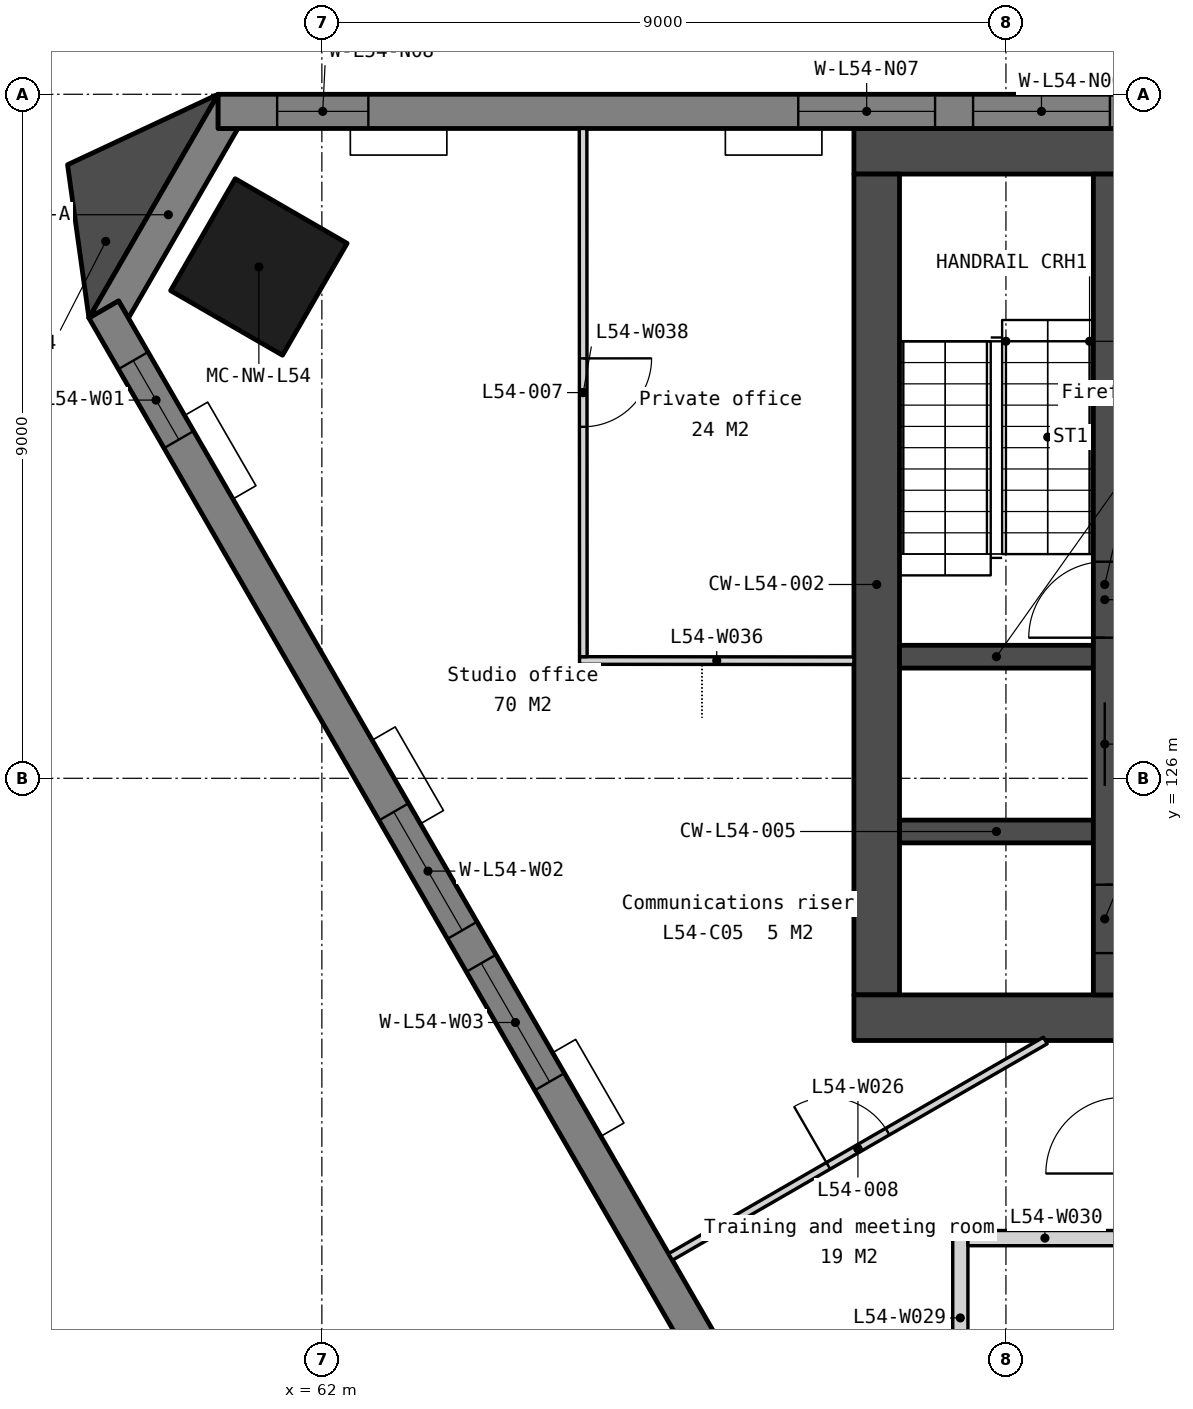
"""IFC4 building model, lengths in metres.
Left out: names, types, materials, properties, quantities, classifications, styles, units other than length and angle.
Written with IfcOpenShell. Run it as: python <this file> out.ifc"""

import sys

from ifc_helpers import new_model, si_unit, direction, frame, frame_2d, origin, origin_2d, place, context, subcontext, project, spatial, polyline, rectangle, outline, extrude, element, fill, save


model = new_model("IFC4")
c1 = context("Model", 3, precision=1e-05, world=origin(), true_north=direction((0.0, 1.0)))
c2 = subcontext(c1, "Body", "Model", "MODEL_VIEW")
j1 = project(units=[si_unit("LENGTHUNIT", "METRE"), si_unit("PLANEANGLEUNIT", "RADIAN")], contexts=[c1])
p1 = place(None, origin())
s1 = spatial("IfcSite", under=j1, at=p1, CompositionType="ELEMENT")
p2 = place(p1, origin())
s2 = spatial("IfcBuilding", under=s1, at=p2, CompositionType="ELEMENT")
p3 = place(p2, frame((0.0, 0.0, 215.3)))
s3 = spatial("IfcBuildingStorey", under=s2, at=p3, CompositionType="ELEMENT", Elevation=215.3)
p4 = place(p3, frame((61.171, 132.728, 0.0), z_axis=(0.0, 0.0, 1.0), x_axis=(-0.5, -0.866025403784, 0.0)))
e1 = element("IfcColumn", 1, at=p4, inside=s3, PredefinedType="COLUMN", context=c2, shape_type="SweptSolid", body=[
    extrude(rectangle(XDim=1.7, YDim=1.7, at=origin_2d()), origin(), (0.0, 0.0, 1.0), 3.9),
])
p5 = place(p3, frame((69.0, 134.25, 0.0), z_axis=(0.0, 0.0, 1.0), x_axis=(1.0, 0.0, 0.0)))
e2 = element("IfcWall", 2, at=p5, inside=s3, PredefinedType="SOLIDWALL", context=c2, shape_type="SweptSolid", body=[
    extrude(rectangle(XDim=22.0, YDim=0.6, at=frame_2d((11.0, 0.0))), origin(), (0.0, 0.0, 1.0), 3.75),
])
p6 = place(p3, frame((69.3, 133.95, 0.0), z_axis=(0.0, 0.0, 1.0), x_axis=(0.0, -1.0, 0.0)))
e3 = element("IfcWall", 3, at=p6, inside=s3, PredefinedType="SOLIDWALL", context=c2, shape_type="SweptSolid", body=[
    extrude(rectangle(XDim=10.8, YDim=0.6, at=frame_2d((5.4, 0.0))), origin(), (0.0, 0.0, 1.0), 3.75),
])
p7 = place(p3, frame((69.0, 122.85, 0.0), z_axis=(0.0, 0.0, 1.0), x_axis=(1.0, 0.0, 0.0)))
e4 = element("IfcWall", 4, at=p7, inside=s3, PredefinedType="SOLIDWALL", context=c2, shape_type="SweptSolid", body=[
    extrude(rectangle(XDim=22.0, YDim=0.6, at=frame_2d((11.0, 0.0))), origin(), (0.0, 0.0, 1.0), 3.75),
])
p8 = place(p7, frame((16.375, 0.0, 0.0)))
e5 = element("IfcOpeningElement", 5, at=p8, cuts=e4, PredefinedType="OPENING", context=c2, shape_type="SweptSolid", body=[
    extrude(rectangle(XDim=1.8, YDim=2.1, at=frame_2d((0.9, 1.05))), frame((0.0, 0.31, 0.0), z_axis=(0.0, -1.0, 0.0), x_axis=(1.0, 0.0, 0.0)), (0.0, 0.0, 1.0), 0.62),
])
p9 = place(p7, frame((3.825, 0.0, 0.0)))
e6 = element("IfcOpeningElement", 6, at=p9, cuts=e4, PredefinedType="OPENING", context=c2, shape_type="SweptSolid", body=[
    extrude(rectangle(XDim=1.8, YDim=2.1, at=frame_2d((0.9, 1.05))), frame((0.0, 0.31, 0.0), z_axis=(0.0, -1.0, 0.0), x_axis=(1.0, 0.0, 0.0)), (0.0, 0.0, 1.0), 0.62),
])
p10 = place(p7, frame((12.85, 0.0, 0.0)))
e7 = element("IfcOpeningElement", 7, at=p10, cuts=e4, PredefinedType="OPENING", context=c2, shape_type="SweptSolid", body=[
    extrude(rectangle(XDim=1.5, YDim=2.1, at=frame_2d((0.75, 1.05))), frame((0.0, 0.31, 0.0), z_axis=(0.0, -1.0, 0.0), x_axis=(1.0, 0.0, 0.0)), (0.0, 0.0, 1.0), 0.62),
])
for number, where, z_axis, x_axis in (
    (8, (69.6, 127.6, 0.0), (0.0, 0.0, 1.0), (1.0, 0.0, 0.0)),
    (9, (69.6, 125.3, 0.0), (0.0, 0.0, 1.0), (1.0, 0.0, 0.0)),
):
    element("IfcWall", number, at=place(p3, frame(where, z_axis=z_axis, x_axis=x_axis)), inside=s3, PredefinedType="SOLIDWALL", context=c2, shape_type="SweptSolid", body=[
        extrude(rectangle(XDim=2.55, YDim=0.3, at=frame_2d((1.275, 0.0))), origin(), (0.0, 0.0, 1.0), 3.75),
    ])
p11 = place(p3, frame((72.3, 133.95, 0.0), z_axis=(0.0, 0.0, 1.0), x_axis=(0.0, -1.0, 0.0)))
e10 = element("IfcWall", 10, at=p11, inside=s3, PredefinedType="SOLIDWALL", context=c2, shape_type="SweptSolid", body=[
    extrude(rectangle(XDim=10.8, YDim=0.3, at=frame_2d((5.4, 0.0))), origin(), (0.0, 0.0, 1.0), 3.75),
])
p12 = place(p11, frame((6.95, 0.0, 0.0)))
e11 = element("IfcOpeningElement", 11, at=p12, cuts=e10, PredefinedType="OPENING", context=c2, shape_type="SweptSolid", body=[
    extrude(rectangle(XDim=1.1, YDim=2.1, at=frame_2d((0.55, 1.05))), frame((0.0, 0.16, 0.0), z_axis=(0.0, -1.0, 0.0), x_axis=(1.0, 0.0, 0.0)), (0.0, 0.0, 1.0), 0.32),
])
p13 = place(p11, frame((9.35, 0.0, 0.0)))
e12 = element("IfcOpeningElement", 12, at=p13, cuts=e10, PredefinedType="OPENING", context=c2, shape_type="SweptSolid", body=[
    extrude(rectangle(XDim=0.9, YDim=2.1, at=frame_2d((0.45, 1.05))), frame((0.0, 0.16, 0.0), z_axis=(0.0, -1.0, 0.0), x_axis=(1.0, 0.0, 0.0)), (0.0, 0.0, 1.0), 0.32),
])
p14 = place(p11, frame((5.1, 0.0, 0.0)))
e13 = element("IfcOpeningElement", 13, at=p14, cuts=e10, PredefinedType="OPENING", context=c2, shape_type="SweptSolid", body=[
    extrude(rectangle(XDim=1.0, YDim=2.1, at=frame_2d((0.5, 1.05))), frame((0.0, 0.16, 0.0), z_axis=(0.0, -1.0, 0.0), x_axis=(1.0, 0.0, 0.0)), (0.0, 0.0, 1.0), 0.32),
])
p15 = place(p3, frame((0.0, 0.0, -0.15)))
e14 = element("IfcWall", 14, at=p15, inside=s3, PredefinedType="SOLIDWALL", context=c2, shape_type="SweptSolid", body=[
    extrude(outline(polyline([(60.635, 135.0), (60.635, 134.55), (60.895, 134.55), (59.455, 132.055), (59.325, 132.281), (58.935, 132.055), (60.635, 135.0)])), origin(), (0.0, 0.0, 1.0), 3.9),
])
p16 = place(p3, frame((99.365, 134.775, -0.15), z_axis=(0.0, 0.0, 1.0), x_axis=(-1.0, 0.0, 0.0)))
e15 = element("IfcWall", 15, at=p16, inside=s3, PredefinedType="SOLIDWALL", context=c2, shape_type="SweptSolid", body=[
    extrude(outline(polyline([(38.729, 0.0), (38.729, 3.9), (0.0, 3.9), (0.0, 0.0), (38.729, 0.0)])), frame((0.0, 0.225, 0.0), z_axis=(0.0, -1.0, 0.0), x_axis=(1.0, 0.0, 0.0)), (0.0, 0.0, 1.0), 0.45),
])
p17 = place(p16, frame((0.776, 0.0, 0.95)))
e16 = element("IfcOpeningElement", 16, at=p17, cuts=e15, PredefinedType="OPENING", context=c2, shape_type="SweptSolid", body=[
    extrude(rectangle(XDim=1.2, YDim=2.2, at=frame_2d((0.6, 1.1))), frame((0.0, 0.235, 0.0), z_axis=(0.0, -1.0, 0.0), x_axis=(1.0, 0.0, 0.0)), (0.0, 0.0, 1.0), 0.47),
])
p18 = place(p16, frame((7.632, 0.0, 0.95)))
e17 = element("IfcOpeningElement", 17, at=p18, cuts=e15, PredefinedType="OPENING", context=c2, shape_type="SweptSolid", body=[
    extrude(rectangle(XDim=1.8, YDim=2.2, at=frame_2d((0.9, 1.1))), frame((0.0, 0.235, 0.0), z_axis=(0.0, -1.0, 0.0), x_axis=(1.0, 0.0, 0.0)), (0.0, 0.0, 1.0), 0.47),
])
p19 = place(p16, frame((9.932, 0.0, 0.95)))
e18 = element("IfcOpeningElement", 18, at=p19, cuts=e15, PredefinedType="OPENING", context=c2, shape_type="SweptSolid", body=[
    extrude(rectangle(XDim=1.8, YDim=2.2, at=frame_2d((0.9, 1.1))), frame((0.0, 0.235, 0.0), z_axis=(0.0, -1.0, 0.0), x_axis=(1.0, 0.0, 0.0)), (0.0, 0.0, 1.0), 0.47),
])
p20 = place(p16, frame((17.315, 0.0, 0.95)))
e19 = element("IfcOpeningElement", 19, at=p20, cuts=e15, PredefinedType="OPENING", context=c2, shape_type="SweptSolid", body=[
    extrude(rectangle(XDim=1.8, YDim=2.2, at=frame_2d((0.9, 1.1))), frame((0.0, 0.235, 0.0), z_axis=(0.0, -1.0, 0.0), x_axis=(1.0, 0.0, 0.0)), (0.0, 0.0, 1.0), 0.47),
])
p21 = place(p16, frame((19.615, 0.0, 0.95)))
e20 = element("IfcOpeningElement", 20, at=p21, cuts=e15, PredefinedType="OPENING", context=c2, shape_type="SweptSolid", body=[
    extrude(rectangle(XDim=1.8, YDim=2.2, at=frame_2d((0.9, 1.1))), frame((0.0, 0.235, 0.0), z_axis=(0.0, -1.0, 0.0), x_axis=(1.0, 0.0, 0.0)), (0.0, 0.0, 1.0), 0.47),
])
p22 = place(p16, frame((26.997, 0.0, 0.95)))
e21 = element("IfcOpeningElement", 21, at=p22, cuts=e15, PredefinedType="OPENING", context=c2, shape_type="SweptSolid", body=[
    extrude(rectangle(XDim=1.8, YDim=2.2, at=frame_2d((0.9, 1.1))), frame((0.0, 0.235, 0.0), z_axis=(0.0, -1.0, 0.0), x_axis=(1.0, 0.0, 0.0)), (0.0, 0.0, 1.0), 0.47),
])
p23 = place(p16, frame((29.297, 0.0, 0.95)))
e22 = element("IfcOpeningElement", 22, at=p23, cuts=e15, PredefinedType="OPENING", context=c2, shape_type="SweptSolid", body=[
    extrude(rectangle(XDim=1.8, YDim=2.2, at=frame_2d((0.9, 1.1))), frame((0.0, 0.235, 0.0), z_axis=(0.0, -1.0, 0.0), x_axis=(1.0, 0.0, 0.0)), (0.0, 0.0, 1.0), 0.47),
])
p24 = place(p16, frame((36.753, 0.0, 0.95)))
e23 = element("IfcOpeningElement", 23, at=p24, cuts=e15, PredefinedType="OPENING", context=c2, shape_type="SweptSolid", body=[
    extrude(rectangle(XDim=1.2, YDim=2.2, at=frame_2d((0.6, 1.1))), frame((0.0, 0.235, 0.0), z_axis=(0.0, -1.0, 0.0), x_axis=(1.0, 0.0, 0.0)), (0.0, 0.0, 1.0), 0.47),
])
p25 = place(p3, frame((59.13, 132.168, -0.15), z_axis=(0.0, 0.0, 1.0), x_axis=(0.500002199942, -0.866024133644, 0.0)))
e24 = element("IfcWall", 24, at=p25, inside=s3, PredefinedType="SOLIDWALL", context=c2, shape_type="SweptSolid", body=[
    extrude(outline(polyline([(38.729, 0.0), (38.729, 3.9), (0.0, 3.9), (0.0, 0.0), (38.729, 0.0)])), frame((0.0, 0.225, 0.0), z_axis=(0.0, -1.0, 0.0), x_axis=(1.0, 0.0, 0.0)), (0.0, 0.0, 1.0), 0.45),
])
p26 = place(p25, frame((0.776, 0.0, 0.95)))
e25 = element("IfcOpeningElement", 25, at=p26, cuts=e24, PredefinedType="OPENING", context=c2, shape_type="SweptSolid", body=[
    extrude(rectangle(XDim=1.2, YDim=2.2, at=frame_2d((0.6, 1.1))), frame((0.0, 0.235, 0.0), z_axis=(0.0, -1.0, 0.0), x_axis=(1.0, 0.0, 0.0)), (0.0, 0.0, 1.0), 0.47),
])
p27 = place(p25, frame((7.632, 0.0, 0.95)))
e26 = element("IfcOpeningElement", 26, at=p27, cuts=e24, PredefinedType="OPENING", context=c2, shape_type="SweptSolid", body=[
    extrude(rectangle(XDim=1.8, YDim=2.2, at=frame_2d((0.9, 1.1))), frame((0.0, 0.235, 0.0), z_axis=(0.0, -1.0, 0.0), x_axis=(1.0, 0.0, 0.0)), (0.0, 0.0, 1.0), 0.47),
])
p28 = place(p25, frame((9.932, 0.0, 0.95)))
e27 = element("IfcOpeningElement", 27, at=p28, cuts=e24, PredefinedType="OPENING", context=c2, shape_type="SweptSolid", body=[
    extrude(rectangle(XDim=1.8, YDim=2.2, at=frame_2d((0.9, 1.1))), frame((0.0, 0.235, 0.0), z_axis=(0.0, -1.0, 0.0), x_axis=(1.0, 0.0, 0.0)), (0.0, 0.0, 1.0), 0.47),
])
p29 = place(p25, frame((17.315, 0.0, 0.95)))
e28 = element("IfcOpeningElement", 28, at=p29, cuts=e24, PredefinedType="OPENING", context=c2, shape_type="SweptSolid", body=[
    extrude(rectangle(XDim=1.8, YDim=2.2, at=frame_2d((0.9, 1.1))), frame((0.0, 0.235, 0.0), z_axis=(0.0, -1.0, 0.0), x_axis=(1.0, 0.0, 0.0)), (0.0, 0.0, 1.0), 0.47),
])
p30 = place(p25, frame((19.615, 0.0, 0.95)))
e29 = element("IfcOpeningElement", 29, at=p30, cuts=e24, PredefinedType="OPENING", context=c2, shape_type="SweptSolid", body=[
    extrude(rectangle(XDim=1.8, YDim=2.2, at=frame_2d((0.9, 1.1))), frame((0.0, 0.235, 0.0), z_axis=(0.0, -1.0, 0.0), x_axis=(1.0, 0.0, 0.0)), (0.0, 0.0, 1.0), 0.47),
])
p31 = place(p25, frame((26.997, 0.0, 0.95)))
e30 = element("IfcOpeningElement", 30, at=p31, cuts=e24, PredefinedType="OPENING", context=c2, shape_type="SweptSolid", body=[
    extrude(rectangle(XDim=1.8, YDim=2.2, at=frame_2d((0.9, 1.1))), frame((0.0, 0.235, 0.0), z_axis=(0.0, -1.0, 0.0), x_axis=(1.0, 0.0, 0.0)), (0.0, 0.0, 1.0), 0.47),
])
p32 = place(p25, frame((29.297, 0.0, 0.95)))
e31 = element("IfcOpeningElement", 31, at=p32, cuts=e24, PredefinedType="OPENING", context=c2, shape_type="SweptSolid", body=[
    extrude(rectangle(XDim=1.8, YDim=2.2, at=frame_2d((0.9, 1.1))), frame((0.0, 0.235, 0.0), z_axis=(0.0, -1.0, 0.0), x_axis=(1.0, 0.0, 0.0)), (0.0, 0.0, 1.0), 0.47),
])
p33 = place(p25, frame((36.753, 0.0, 0.95)))
e32 = element("IfcOpeningElement", 32, at=p33, cuts=e24, PredefinedType="OPENING", context=c2, shape_type="SweptSolid", body=[
    extrude(rectangle(XDim=1.2, YDim=2.2, at=frame_2d((0.6, 1.1))), frame((0.0, 0.235, 0.0), z_axis=(0.0, -1.0, 0.0), x_axis=(1.0, 0.0, 0.0)), (0.0, 0.0, 1.0), 0.47),
])
p34 = place(p3, frame((0.0, 0.0, -0.15)))
e33 = element("IfcWall", 33, at=p34, inside=s3, PredefinedType="SOLIDWALL", context=c2, shape_type="SweptSolid", body=[
    extrude(outline(polyline([(60.635, 135.0), (58.654, 134.073), (58.935, 132.055), (60.635, 135.0)])), origin(), (0.0, 0.0, 1.0), 3.9),
])
p35 = place(p3, frame((66.587, 119.703, 0.0), z_axis=(0.0, 0.0, 1.0), x_axis=(0.866023511746, 0.500003277092, 0.0)))
e34 = element("IfcWall", 34, at=p35, inside=s3, PredefinedType="PARTITIONING", context=c2, shape_type="SweptSolid", body=[
    extrude(rectangle(XDim=5.694, YDim=0.1, at=frame_2d((2.847, 0.0))), origin(), (0.0, 0.0, 1.0), 3.75),
])
p36 = place(p35, frame((2.397, 0.0, 0.0)))
e35 = element("IfcOpeningElement", 35, at=p36, cuts=e34, PredefinedType="OPENING", context=c2, shape_type="SweptSolid", body=[
    extrude(rectangle(XDim=0.9, YDim=2.1, at=frame_2d((0.45, 1.05))), frame((0.0, 0.06, 0.0), z_axis=(0.0, -1.0, 0.0), x_axis=(1.0, 0.0, 0.0)), (0.0, 0.0, 1.0), 0.12),
])
p37 = place(p3, frame((70.4, 117.75, 0.0), z_axis=(0.0, 0.0, 1.0), x_axis=(0.0, 1.0, 0.0)))
e36 = element("IfcWall", 36, at=p37, inside=s3, PredefinedType="PARTITIONING", context=c2, shape_type="SweptSolid", body=[
    extrude(rectangle(XDim=2.3, YDim=0.2, at=frame_2d((1.15, 0.0))), origin(), (0.0, 0.0, 1.0), 3.75),
])
p38 = place(p3, frame((70.5, 119.95, 0.0), z_axis=(0.0, 0.0, 1.0), x_axis=(1.0, 0.0, 0.0)))
e37 = element("IfcWall", 37, at=p38, inside=s3, PredefinedType="PARTITIONING", context=c2, shape_type="SweptSolid", body=[
    extrude(rectangle(XDim=2.025, YDim=0.2, at=frame_2d((1.012, 0.0))), origin(), (0.0, 0.0, 1.0), 3.75),
])
p39 = place(p3, frame((65.39, 127.55, 0.0), z_axis=(0.0, 0.0, 1.0), x_axis=(0.99999967067, -0.000811578253, 0.0)))
e38 = element("IfcWall", 38, at=p39, inside=s3, PredefinedType="PARTITIONING", context=c2, shape_type="SweptSolid", body=[
    extrude(rectangle(XDim=3.61, YDim=0.1, at=frame_2d((1.805, 0.0))), origin(), (0.0, 0.0, 1.0), 3.75),
])
p40 = place(p3, frame((65.437, 134.55, 0.0), z_axis=(0.0, 0.0, 1.0), x_axis=(0.000491814737, -0.999999879059, 0.0)))
e39 = element("IfcWall", 39, at=p40, inside=s3, PredefinedType="PARTITIONING", context=c2, shape_type="SweptSolid", body=[
    extrude(rectangle(XDim=6.95, YDim=0.1, at=frame_2d((3.475, 0.0))), origin(), (0.0, 0.0, 1.0), 3.75),
])
p41 = place(p40, frame((3.025, 0.0, 0.0)))
e40 = element("IfcOpeningElement", 40, at=p41, cuts=e39, PredefinedType="OPENING", context=c2, shape_type="SweptSolid", body=[
    extrude(rectangle(XDim=0.9, YDim=2.1, at=frame_2d((0.45, 1.05))), frame((0.0, 0.06, 0.0), z_axis=(0.0, -1.0, 0.0), x_axis=(1.0, 0.0, 0.0)), (0.0, 0.0, 1.0), 0.12),
])
p42 = place(p12, origin())
e41 = element("IfcDoor", 41, at=p42, inside=s3, OperationType="SLIDING_TO_LEFT", PredefinedType="DOOR", context=c2, shape_type="SweptSolid", body=[
    extrude(rectangle(XDim=1.1, YDim=2.1, at=frame_2d((0.55, 1.05))), frame((0.0, 0.025, 0.0), z_axis=(0.0, -1.0, 0.0), x_axis=(1.0, 0.0, 0.0)), (0.0, 0.0, 1.0), 0.05),
])
fill(e11, e41)
p43 = place(p13, origin())
e42 = element("IfcDoor", 42, at=p43, inside=s3, OperationType="SINGLE_SWING_LEFT", PredefinedType="DOOR", context=c2, shape_type="SweptSolid", body=[
    extrude(rectangle(XDim=0.9, YDim=2.1, at=frame_2d((0.45, 1.05))), frame((0.0, 0.025, 0.0), z_axis=(0.0, -1.0, 0.0), x_axis=(1.0, 0.0, 0.0)), (0.0, 0.0, 1.0), 0.05),
])
fill(e12, e42)
p44 = place(p14, origin())
e43 = element("IfcDoor", 43, at=p44, inside=s3, OperationType="SINGLE_SWING_RIGHT", PredefinedType="DOOR", context=c2, shape_type="SweptSolid", body=[
    extrude(rectangle(XDim=1.0, YDim=2.1, at=frame_2d((0.5, 1.05))), frame((0.0, 0.025, 0.0), z_axis=(0.0, -1.0, 0.0), x_axis=(1.0, 0.0, 0.0)), (0.0, 0.0, 1.0), 0.05),
])
fill(e13, e43)
p45 = place(p22, origin())
e44 = element("IfcWindow", 44, at=p45, inside=s3, PartitioningType="SINGLE_PANEL", PredefinedType="WINDOW", context=c2, shape_type="SweptSolid", body=[
    extrude(rectangle(XDim=1.8, YDim=2.2, at=frame_2d((0.9, 1.1))), frame((0.0, 0.03, 0.0), z_axis=(0.0, -1.0, 0.0), x_axis=(1.0, 0.0, 0.0)), (0.0, 0.0, 1.0), 0.06),
])
fill(e21, e44)
p46 = place(p23, origin())
e45 = element("IfcWindow", 45, at=p46, inside=s3, PartitioningType="SINGLE_PANEL", PredefinedType="WINDOW", context=c2, shape_type="SweptSolid", body=[
    extrude(rectangle(XDim=1.8, YDim=2.2, at=frame_2d((0.9, 1.1))), frame((0.0, 0.03, 0.0), z_axis=(0.0, -1.0, 0.0), x_axis=(1.0, 0.0, 0.0)), (0.0, 0.0, 1.0), 0.06),
])
fill(e22, e45)
p47 = place(p24, origin())
e46 = element("IfcWindow", 46, at=p47, inside=s3, PartitioningType="SINGLE_PANEL", PredefinedType="WINDOW", context=c2, shape_type="SweptSolid", body=[
    extrude(rectangle(XDim=1.2, YDim=2.2, at=frame_2d((0.6, 1.1))), frame((0.0, 0.03, 0.0), z_axis=(0.0, -1.0, 0.0), x_axis=(1.0, 0.0, 0.0)), (0.0, 0.0, 1.0), 0.06),
])
fill(e23, e46)
p48 = place(p26, origin())
e47 = element("IfcWindow", 47, at=p48, inside=s3, PartitioningType="SINGLE_PANEL", PredefinedType="WINDOW", context=c2, shape_type="SweptSolid", body=[
    extrude(rectangle(XDim=1.2, YDim=2.2, at=frame_2d((0.6, 1.1))), frame((0.0, 0.03, 0.0), z_axis=(0.0, -1.0, 0.0), x_axis=(1.0, 0.0, 0.0)), (0.0, 0.0, 1.0), 0.06),
])
fill(e25, e47)
p49 = place(p27, origin())
e48 = element("IfcWindow", 48, at=p49, inside=s3, PartitioningType="SINGLE_PANEL", PredefinedType="WINDOW", context=c2, shape_type="SweptSolid", body=[
    extrude(rectangle(XDim=1.8, YDim=2.2, at=frame_2d((0.9, 1.1))), frame((0.0, 0.03, 0.0), z_axis=(0.0, -1.0, 0.0), x_axis=(1.0, 0.0, 0.0)), (0.0, 0.0, 1.0), 0.06),
])
fill(e26, e48)
p50 = place(p28, origin())
e49 = element("IfcWindow", 49, at=p50, inside=s3, PartitioningType="SINGLE_PANEL", PredefinedType="WINDOW", context=c2, shape_type="SweptSolid", body=[
    extrude(rectangle(XDim=1.8, YDim=2.2, at=frame_2d((0.9, 1.1))), frame((0.0, 0.03, 0.0), z_axis=(0.0, -1.0, 0.0), x_axis=(1.0, 0.0, 0.0)), (0.0, 0.0, 1.0), 0.06),
])
fill(e27, e49)
p51 = place(p41, origin())
e50 = element("IfcDoor", 50, at=p51, inside=s3, OperationType="SINGLE_SWING_LEFT", PredefinedType="DOOR", context=c2, shape_type="SweptSolid", body=[
    extrude(rectangle(XDim=0.9, YDim=2.1, at=frame_2d((0.45, 1.05))), frame((0.0, 0.025, 0.0), z_axis=(0.0, -1.0, 0.0), x_axis=(1.0, 0.0, 0.0)), (0.0, 0.0, 1.0), 0.05),
])
fill(e40, e50)
p52 = place(p36, origin())
e51 = element("IfcDoor", 51, at=p52, inside=s3, OperationType="SINGLE_SWING_LEFT", PredefinedType="DOOR", context=c2, shape_type="SweptSolid", body=[
    extrude(rectangle(XDim=0.9, YDim=2.1, at=frame_2d((0.45, 1.05))), frame((0.0, 0.025, 0.0), z_axis=(0.0, -1.0, 0.0), x_axis=(1.0, 0.0, 0.0)), (0.0, 0.0, 1.0), 0.05),
])
fill(e35, e51)
save(model, sys.argv[1])
